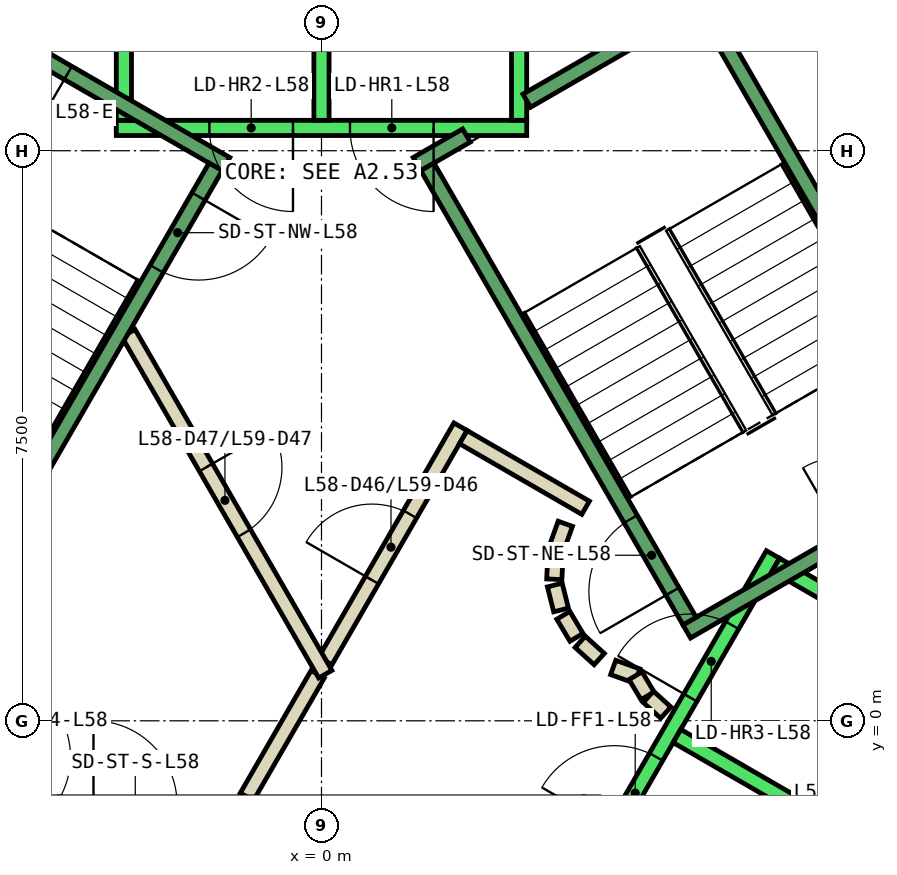
"""IFC4 building model, lengths in metres.
Left out: names, types, materials, properties, quantities, classifications, styles, units other than length and angle.
Written with IfcOpenShell. Run it as: python <this file> out.ifc"""

import sys

from ifc_helpers import new_model, si_unit, direction, frame, frame_2d, origin, place, context, subcontext, project, spatial, polyline, rectangle, outline, extrude, element, fill, save


model = new_model("IFC4")
c1 = context("Model", 3, precision=1e-05, world=origin(), true_north=direction((0.0, 1.0)))
c2 = subcontext(c1, "Body", "Model", "MODEL_VIEW")
j1 = project(units=[si_unit("LENGTHUNIT", "METRE"), si_unit("PLANEANGLEUNIT", "RADIAN")], contexts=[c1])
p1 = place(None, origin())
s1 = spatial("IfcSite", under=j1, at=p1, CompositionType="ELEMENT")
p2 = place(p1, origin())
s2 = spatial("IfcBuilding", under=s1, at=p2, CompositionType="ELEMENT")
p3 = place(p2, frame((0.0, 0.0, 255.8)))
s3 = spatial("IfcBuildingStorey", under=s2, at=p3, CompositionType="ELEMENT", Elevation=255.8)
p4 = place(p3, frame((0.0, 0.0, -0.34)))
e1 = element("IfcWall", 1, at=p4, inside=s3, PredefinedType="SHEAR", context=c2, shape_type="SweptSolid", body=[
    extrude(outline(polyline([(6.786, 10.747), (6.266, 10.447), (10.854, 2.5), (11.547, 2.5), (6.786, 10.747)])), origin(), (0.0, 0.0, 1.0), 3.6),
])
p5 = place(p3, frame((0.0, 0.0, -0.34)))
e2 = element("IfcWall", 2, at=p5, inside=s3, PredefinedType="SHEAR", context=c2, shape_type="SweptSolid", body=[
    extrude(outline(polyline([(5.774, -7.5), (11.547, 2.5), (10.854, 2.5), (5.427, -6.9), (5.774, -7.5)])), origin(), (0.0, 0.0, 1.0), 3.6),
])
p6 = place(p3, frame((-0.982, -1.0, 0.0), z_axis=(0.0, 0.0, 1.0), x_axis=(0.50024047865, 0.865886518847, 0.0)))
e3 = element("IfcWall", 3, at=p6, inside=s3, PredefinedType="PARTITIONING", context=c2, shape_type="SweptSolid", body=[
    extrude(rectangle(XDim=1.863, YDim=0.2, at=frame_2d((0.931, 0.0))), origin(), (0.0, 0.0, 1.0), 3.26),
])
p7 = place(p3, frame((0.05, 0.787, 0.0), z_axis=(0.0, 0.0, 1.0), x_axis=(0.499954076797, 0.866051915934, 0.0)))
e4 = element("IfcWall", 4, at=p7, inside=s3, PredefinedType="PARTITIONING", context=c2, shape_type="SweptSolid", body=[
    extrude(rectangle(XDim=3.558, YDim=0.2, at=frame_2d((1.779, 0.0))), origin(), (0.0, 0.0, 1.0), 3.26),
])
p8 = place(p7, frame((1.229, 0.0, 0.0)))
e5 = element("IfcOpeningElement", 5, at=p8, cuts=e4, PredefinedType="OPENING", context=c2, shape_type="SweptSolid", body=[
    extrude(rectangle(XDim=1.0, YDim=2.1, at=frame_2d((0.5, 1.05))), frame((0.0, 0.11, 0.0), z_axis=(0.0, -1.0, 0.0), x_axis=(1.0, 0.0, 0.0)), (0.0, 0.0, 1.0), 0.22),
])
p9 = place(p3, frame((1.866, 3.732, 0.0), z_axis=(0.0, 0.0, 1.0), x_axis=(0.866043361281, -0.499968895414, 0.0)))
e6 = element("IfcWall", 6, at=p9, inside=s3, PredefinedType="PARTITIONING", context=c2, shape_type="SweptSolid", body=[
    extrude(rectangle(XDim=1.858, YDim=0.2, at=frame_2d((0.929, 0.0))), origin(), (0.0, 0.0, 1.0), 3.26),
])
p10 = place(p3, frame((3.208, 2.592, 0.0), z_axis=(0.0, 0.0, 1.0), x_axis=(-0.337388820924, -0.941365382578, 0.0)))
e7 = element("IfcWall", 7, at=p10, inside=s3, PredefinedType="PARTITIONING", context=c2, shape_type="SweptSolid", body=[
    extrude(rectangle(XDim=0.338, YDim=0.2, at=frame_2d((0.169, 0.0))), origin(), (0.0, 0.0, 1.0), 3.26),
])
p11 = place(p3, frame((3.079, 2.199, 0.0), z_axis=(0.0, 0.0, 1.0), x_axis=(-0.047771483479, -0.998858290933, 0.0)))
e8 = element("IfcWall", 8, at=p11, inside=s3, PredefinedType="PARTITIONING", context=c2, shape_type="SweptSolid", body=[
    extrude(rectangle(XDim=0.337, YDim=0.2, at=frame_2d((0.169, 0.0))), origin(), (0.0, 0.0, 1.0), 3.26),
])
p12 = place(p3, frame((3.07, 1.786, 0.0), z_axis=(0.0, 0.0, 1.0), x_axis=(0.242705583207, -0.970099994784, 0.0)))
e9 = element("IfcWall", 9, at=p12, inside=s3, PredefinedType="PARTITIONING", context=c2, shape_type="SweptSolid", body=[
    extrude(rectangle(XDim=0.338, YDim=0.2, at=frame_2d((0.169, 0.0))), origin(), (0.0, 0.0, 1.0), 3.26),
])
for number, where, z_axis, x_axis in (
    (10, (3.182, 1.388, 0.0), (0.0, 0.0, 1.0), (0.512, -0.859, 0.0)),
    (11, (3.404, 1.039, 0.0), (0.0, 0.0, 1.0), (0.74, -0.672, 0.0)),
):
    element("IfcWall", number, at=place(p3, frame(where, z_axis=z_axis, x_axis=x_axis)), inside=s3, PredefinedType="PARTITIONING", context=c2, shape_type="SweptSolid", body=[
        extrude(rectangle(XDim=0.338, YDim=0.2, at=frame_2d((0.169, 0.0))), origin(), (0.0, 0.0, 1.0), 3.26),
    ])
p13 = place(p3, frame((3.838, 0.702, 0.0), z_axis=(0.0, 0.0, 1.0), x_axis=(0.941035081519, -0.338308993895, 0.0)))
e12 = element("IfcWall", 12, at=p13, inside=s3, PredefinedType="PARTITIONING", context=c2, shape_type="SweptSolid", body=[
    extrude(rectangle(XDim=0.337, YDim=0.2, at=frame_2d((0.168, 0.0))), origin(), (0.0, 0.0, 1.0), 3.26),
])
p14 = place(p3, frame((4.132, 0.593, 0.0), z_axis=(0.0, 0.0, 1.0), x_axis=(0.513561617048, -0.858052717201, 0.0)))
e13 = element("IfcWall", 13, at=p14, inside=s3, PredefinedType="PARTITIONING", context=c2, shape_type="SweptSolid", body=[
    extrude(rectangle(XDim=0.308, YDim=0.2, at=frame_2d((0.154, 0.0))), origin(), (0.0, 0.0, 1.0), 3.26),
])
p15 = place(p3, frame((4.301, 0.315, 0.0), z_axis=(0.0, 0.0, 1.0), x_axis=(0.741798017506, -0.670623367639, 0.0)))
e14 = element("IfcWall", 14, at=p15, inside=s3, PredefinedType="PARTITIONING", context=c2, shape_type="SweptSolid", body=[
    extrude(rectangle(XDim=0.309, YDim=0.2, at=frame_2d((0.154, 0.0))), origin(), (0.0, 0.0, 1.0), 3.26),
])
p16 = place(p3, frame((-2.54, 5.1, 0.0), z_axis=(0.0, 0.0, 1.0), x_axis=(0.499925051871, -0.866068670783, 0.0)))
e15 = element("IfcWall", 15, at=p16, inside=s3, PredefinedType="PARTITIONING", context=c2, shape_type="SweptSolid", body=[
    extrude(rectangle(XDim=5.181, YDim=0.2, at=frame_2d((2.59, 0.0))), origin(), (0.0, 0.0, 1.0), 3.26),
])
p17 = place(p16, frame((2.04, 0.0, 0.0)))
e16 = element("IfcOpeningElement", 16, at=p17, cuts=e15, PredefinedType="OPENING", context=c2, shape_type="SweptSolid", body=[
    extrude(rectangle(XDim=1.0, YDim=2.1, at=frame_2d((0.5, 1.05))), frame((0.0, 0.11, 0.0), z_axis=(0.0, -1.0, 0.0), x_axis=(1.0, 0.0, 0.0)), (0.0, 0.0, 1.0), 0.22),
])
p18 = place(p3, frame((2.7, 7.8, 0.0), z_axis=(0.0, 0.0, 1.0), x_axis=(-1.0, 0.0, 0.0)))
e17 = element("IfcWall", 17, at=p18, inside=s3, PredefinedType="STANDARD", context=c2, shape_type="SweptSolid", body=[
    extrude(rectangle(XDim=5.4, YDim=0.2, at=frame_2d((2.7, 0.0))), origin(), (0.0, 0.0, 1.0), 3.26),
])
p19 = place(p18, frame((1.225, 0.0, 0.0)))
e18 = element("IfcOpeningElement", 18, at=p19, cuts=e17, PredefinedType="OPENING", context=c2, shape_type="SweptSolid", body=[
    extrude(rectangle(XDim=1.1, YDim=2.1, at=frame_2d((0.55, 1.05))), frame((0.0, 0.11, 0.0), z_axis=(0.0, -1.0, 0.0), x_axis=(1.0, 0.0, 0.0)), (0.0, 0.0, 1.0), 0.22),
])
p20 = place(p18, frame((3.075, 0.0, 0.0)))
e19 = element("IfcOpeningElement", 19, at=p20, cuts=e17, PredefinedType="OPENING", context=c2, shape_type="SweptSolid", body=[
    extrude(rectangle(XDim=1.1, YDim=2.1, at=frame_2d((0.55, 1.05))), frame((0.0, 0.11, 0.0), z_axis=(0.0, -1.0, 0.0), x_axis=(1.0, 0.0, 0.0)), (0.0, 0.0, 1.0), 0.22),
])
for number, where, z_axis, x_axis in (
    (20, (2.6, 7.9, 0.0), (0.0, 0.0, 1.0), (0.0, 1.0, 0.0)),
    (21, (0.0, 7.9, 0.0), (0.0, 0.0, 1.0), (0.0, 1.0, 0.0)),
    (22, (-2.6, 7.9, 0.0), (0.0, 0.0, 1.0), (0.0, 1.0, 0.0)),
):
    element("IfcWall", number, at=place(p3, frame(where, z_axis=z_axis, x_axis=x_axis)), inside=s3, PredefinedType="STANDARD", context=c2, shape_type="SweptSolid", body=[
        extrude(rectangle(XDim=2.4, YDim=0.2, at=frame_2d((1.2, 0.0))), origin(), (0.0, 0.0, 1.0), 3.26),
    ])
p21 = place(p3, frame((-5.94, 2.188, 0.0), z_axis=(0.0, 0.0, 1.0), x_axis=(0.500034260056, -0.866005622828, 0.0)))
e23 = element("IfcWall", 23, at=p21, inside=s3, PredefinedType="STANDARD", context=c2, shape_type="SweptSolid", body=[
    extrude(rectangle(XDim=5.399, YDim=0.2, at=frame_2d((2.7, 0.0))), origin(), (0.0, 0.0, 1.0), 3.26),
])
p22 = place(p21, frame((3.075, 0.0, 0.0)))
e24 = element("IfcOpeningElement", 24, at=p22, cuts=e23, PredefinedType="OPENING", context=c2, shape_type="SweptSolid", body=[
    extrude(rectangle(XDim=1.1, YDim=2.1, at=frame_2d((0.55, 1.05))), frame((0.0, 0.11, 0.0), z_axis=(0.0, -1.0, 0.0), x_axis=(1.0, 0.0, 0.0)), (0.0, 0.0, 1.0), 0.22),
])
p23 = place(p21, frame((1.225, 0.0, 0.0)))
e25 = element("IfcOpeningElement", 25, at=p23, cuts=e23, PredefinedType="OPENING", context=c2, shape_type="SweptSolid", body=[
    extrude(rectangle(XDim=1.1, YDim=2.1, at=frame_2d((0.55, 1.05))), frame((0.0, 0.11, 0.0), z_axis=(0.0, -1.0, 0.0), x_axis=(1.0, 0.0, 0.0)), (0.0, 0.0, 1.0), 0.22),
])
p24 = place(p3, frame((3.24, -2.488, 0.0), z_axis=(0.0, 0.0, 1.0), x_axis=(0.500034260056, 0.866005622828, 0.0)))
e26 = element("IfcWall", 26, at=p24, inside=s3, PredefinedType="STANDARD", context=c2, shape_type="SweptSolid", body=[
    extrude(rectangle(XDim=5.399, YDim=0.2, at=frame_2d((2.7, 0.0))), origin(), (0.0, 0.0, 1.0), 3.26),
])
p25 = place(p24, frame((3.225, 0.0, 0.0)))
e27 = element("IfcOpeningElement", 27, at=p25, cuts=e26, PredefinedType="OPENING", context=c2, shape_type="SweptSolid", body=[
    extrude(rectangle(XDim=1.1, YDim=2.1, at=frame_2d((0.55, 1.05))), frame((0.0, 0.11, 0.0), z_axis=(0.0, -1.0, 0.0), x_axis=(1.0, 0.0, 0.0)), (0.0, 0.0, 1.0), 0.22),
])
p26 = place(p24, frame((1.225, 0.0, 0.0)))
e28 = element("IfcOpeningElement", 28, at=p26, cuts=e26, PredefinedType="OPENING", context=c2, shape_type="SweptSolid", body=[
    extrude(rectangle(XDim=1.1, YDim=2.1, at=frame_2d((0.55, 1.05))), frame((0.0, 0.11, 0.0), z_axis=(0.0, -1.0, 0.0), x_axis=(1.0, 0.0, 0.0)), (0.0, 0.0, 1.0), 0.22),
])
p27 = place(p3, frame((5.492, -3.788, 0.0), z_axis=(0.0, 0.0, 1.0), x_axis=(0.500034260056, 0.866005622828, 0.0)))
e29 = element("IfcWall", 29, at=p27, inside=s3, PredefinedType="STANDARD", context=c2, shape_type="SweptSolid", body=[
    extrude(rectangle(XDim=5.399, YDim=0.2, at=frame_2d((2.7, 0.0))), origin(), (0.0, 0.0, 1.0), 3.26),
])
for number, where, z_axis, x_axis in (
    (30, (4.677, -0.2, 0.0), (0.0, 0.0, 1.0), (0.866, -0.5, 0.0)),
    (31, (5.977, 2.052, 0.0), (0.0, 0.0, 1.0), (0.866, -0.5, 0.0)),
):
    element("IfcWall", number, at=place(p3, frame(where, z_axis=z_axis, x_axis=x_axis)), inside=s3, PredefinedType="STANDARD", context=c2, shape_type="SweptSolid", body=[
        extrude(rectangle(XDim=2.399, YDim=0.2, at=frame_2d((1.2, 0.0))), origin(), (0.0, 0.0, 1.0), 3.26),
    ])
p28 = place(p3, frame((4.806, 1.176, 0.0), z_axis=(0.0, 0.0, 1.0), x_axis=(0.866059941101, 0.499940174841, 0.0)))
e32 = element("IfcWall", 32, at=p28, inside=s3, PredefinedType="STANDARD", context=c2, shape_type="SweptSolid", body=[
    extrude(rectangle(XDim=4.4, YDim=0.2, at=frame_2d((2.2, 0.0))), origin(), (0.0, 0.0, 1.0), 3.26),
])
p29 = place(p28, frame((2.4, 0.0, 0.0)))
e33 = element("IfcOpeningElement", 33, at=p29, cuts=e32, PredefinedType="OPENING", context=c2, shape_type="SweptSolid", body=[
    extrude(rectangle(XDim=1.1, YDim=2.2, at=frame_2d((0.55, 1.1))), frame((0.0, 0.11, 0.0), z_axis=(0.0, -1.0, 0.0), x_axis=(1.0, 0.0, 0.0)), (0.0, 0.0, 1.0), 0.22),
])
p30 = place(p3, frame((2.7, 8.158, 0.0), z_axis=(0.0, 0.0, 1.0), x_axis=(0.86611865017, 0.499838457731, 0.0)))
e34 = element("IfcWall", 34, at=p30, inside=s3, PredefinedType="STANDARD", context=c2, shape_type="SweptSolid", body=[
    extrude(rectangle(XDim=2.733, YDim=0.2, at=frame_2d((1.366, 0.0))), origin(), (0.0, 0.0, 1.0), 3.26),
])
p31 = place(p3, frame((1.256, 7.324, 0.0), z_axis=(0.0, 0.0, 1.0), x_axis=(0.865915093549, 0.500191014278, 0.0)))
e35 = element("IfcWall", 35, at=p31, inside=s3, PredefinedType="STANDARD", context=c2, shape_type="SweptSolid", body=[
    extrude(rectangle(XDim=0.752, YDim=0.2, at=frame_2d((0.376, 0.0))), origin(), (0.0, 0.0, 1.0), 3.26),
])
p32 = place(p3, frame((4.843, 1.312, 0.0), z_axis=(0.0, 0.0, 1.0), x_axis=(-0.499963383562, 0.866046543262, 0.0)))
e36 = element("IfcWall", 36, at=p32, inside=s3, PredefinedType="STANDARD", context=c2, shape_type="SweptSolid", body=[
    extrude(rectangle(XDim=6.9, YDim=0.2, at=frame_2d((3.45, 0.0))), origin(), (0.0, 0.0, 1.0), 3.26),
])
p33 = place(p32, frame((0.45, 0.0, 0.0)))
e37 = element("IfcOpeningElement", 37, at=p33, cuts=e36, PredefinedType="OPENING", context=c2, shape_type="SweptSolid", body=[
    extrude(rectangle(XDim=1.1, YDim=2.2, at=frame_2d((0.55, 1.1))), frame((0.0, 0.11, 0.0), z_axis=(0.0, -1.0, 0.0), x_axis=(1.0, 0.0, 0.0)), (0.0, 0.0, 1.0), 0.22),
])
p34 = place(p3, frame((8.48, 3.412, 0.0), z_axis=(0.0, 0.0, 1.0), x_axis=(-0.499978703459, 0.866037698999, 0.0)))
e38 = element("IfcWall", 38, at=p34, inside=s3, PredefinedType="STANDARD", context=c2, shape_type="SweptSolid", body=[
    extrude(rectangle(XDim=6.9, YDim=0.2, at=frame_2d((3.45, 0.0))), origin(), (0.0, 0.0, 1.0), 3.26),
])
p35 = place(p3, frame((-1.256, 7.324, 0.0), z_axis=(0.0, 0.0, 1.0), x_axis=(-0.866046073146, 0.499964197906, 0.0)))
e39 = element("IfcWall", 39, at=p35, inside=s3, PredefinedType="STANDARD", context=c2, shape_type="SweptSolid", body=[
    extrude(rectangle(XDim=4.4, YDim=0.2, at=frame_2d((2.2, 0.0))), origin(), (0.0, 0.0, 1.0), 3.26),
])
p36 = place(p35, frame((2.4, 0.0, 0.0)))
e40 = element("IfcOpeningElement", 40, at=p36, cuts=e39, PredefinedType="OPENING", context=c2, shape_type="SweptSolid", body=[
    extrude(rectangle(XDim=1.1, YDim=2.2, at=frame_2d((0.55, 1.1))), frame((0.0, 0.11, 0.0), z_axis=(0.0, -1.0, 0.0), x_axis=(1.0, 0.0, 0.0)), (0.0, 0.0, 1.0), 0.22),
])
p37 = place(p3, frame((-1.393, 7.288, 0.0), z_axis=(0.0, 0.0, 1.0), x_axis=(-0.499963383562, -0.866046543262, 0.0)))
e41 = element("IfcWall", 41, at=p37, inside=s3, PredefinedType="STANDARD", context=c2, shape_type="SweptSolid", body=[
    extrude(rectangle(XDim=6.9, YDim=0.2, at=frame_2d((3.45, 0.0))), origin(), (0.0, 0.0, 1.0), 3.26),
])
p38 = place(p37, frame((0.45, 0.0, 0.0)))
e42 = element("IfcOpeningElement", 42, at=p38, cuts=e41, PredefinedType="OPENING", context=c2, shape_type="SweptSolid", body=[
    extrude(rectangle(XDim=1.1, YDim=2.2, at=frame_2d((0.55, 1.1))), frame((0.0, 0.11, 0.0), z_axis=(0.0, -1.0, 0.0), x_axis=(1.0, 0.0, 0.0)), (0.0, 0.0, 1.0), 0.22),
])
p39 = place(p8, origin())
e43 = element("IfcDoor", 43, at=p39, inside=s3, OperationType="SINGLE_SWING_RIGHT", PredefinedType="DOOR", context=c2, shape_type="SweptSolid", body=[
    extrude(rectangle(XDim=1.0, YDim=2.1, at=frame_2d((0.5, 1.05))), frame((0.0, 0.025, 0.0), z_axis=(0.0, -1.0, 0.0), x_axis=(1.0, 0.0, 0.0)), (0.0, 0.0, 1.0), 0.05),
])
fill(e5, e43)
p40 = place(p17, origin())
e44 = element("IfcDoor", 44, at=p40, inside=s3, OperationType="SINGLE_SWING_RIGHT", PredefinedType="DOOR", context=c2, shape_type="SweptSolid", body=[
    extrude(rectangle(XDim=1.0, YDim=2.1, at=frame_2d((0.5, 1.05))), frame((0.0, 0.025, 0.0), z_axis=(0.0, -1.0, 0.0), x_axis=(1.0, 0.0, 0.0)), (0.0, 0.0, 1.0), 0.05),
])
fill(e16, e44)
p41 = place(p19, origin())
e45 = element("IfcDoor", 45, at=p41, inside=s3, OperationType="SLIDING_TO_LEFT", PredefinedType="DOOR", context=c2, shape_type="SweptSolid", body=[
    extrude(rectangle(XDim=1.1, YDim=2.1, at=frame_2d((0.55, 1.05))), frame((0.0, 0.025, 0.0), z_axis=(0.0, -1.0, 0.0), x_axis=(1.0, 0.0, 0.0)), (0.0, 0.0, 1.0), 0.05),
])
fill(e18, e45)
p42 = place(p20, origin())
e46 = element("IfcDoor", 46, at=p42, inside=s3, OperationType="SLIDING_TO_LEFT", PredefinedType="DOOR", context=c2, shape_type="SweptSolid", body=[
    extrude(rectangle(XDim=1.1, YDim=2.1, at=frame_2d((0.55, 1.05))), frame((0.0, 0.025, 0.0), z_axis=(0.0, -1.0, 0.0), x_axis=(1.0, 0.0, 0.0)), (0.0, 0.0, 1.0), 0.05),
])
fill(e19, e46)
p43 = place(p25, origin())
e47 = element("IfcDoor", 47, at=p43, inside=s3, OperationType="SLIDING_TO_LEFT", PredefinedType="DOOR", context=c2, shape_type="SweptSolid", body=[
    extrude(rectangle(XDim=1.1, YDim=2.1, at=frame_2d((0.55, 1.05))), frame((0.0, 0.025, 0.0), z_axis=(0.0, -1.0, 0.0), x_axis=(1.0, 0.0, 0.0)), (0.0, 0.0, 1.0), 0.05),
])
fill(e27, e47)
p44 = place(p26, origin())
e48 = element("IfcDoor", 48, at=p44, inside=s3, OperationType="SLIDING_TO_LEFT", PredefinedType="DOOR", context=c2, shape_type="SweptSolid", body=[
    extrude(rectangle(XDim=1.1, YDim=2.1, at=frame_2d((0.55, 1.05))), frame((0.0, 0.025, 0.0), z_axis=(0.0, -1.0, 0.0), x_axis=(1.0, 0.0, 0.0)), (0.0, 0.0, 1.0), 0.05),
])
fill(e28, e48)
p45 = place(p33, origin())
e49 = element("IfcDoor", 49, at=p45, inside=s3, OperationType="SINGLE_SWING_LEFT", PredefinedType="DOOR", context=c2, shape_type="SweptSolid", body=[
    extrude(rectangle(XDim=1.1, YDim=2.2, at=frame_2d((0.55, 1.1))), frame((0.0, 0.025, 0.0), z_axis=(0.0, -1.0, 0.0), x_axis=(1.0, 0.0, 0.0)), (0.0, 0.0, 1.0), 0.05),
])
fill(e37, e49)
p46 = place(p38, origin())
e50 = element("IfcDoor", 50, at=p46, inside=s3, OperationType="SINGLE_SWING_LEFT", PredefinedType="DOOR", context=c2, shape_type="SweptSolid", body=[
    extrude(rectangle(XDim=1.1, YDim=2.2, at=frame_2d((0.55, 1.1))), frame((0.0, 0.025, 0.0), z_axis=(0.0, -1.0, 0.0), x_axis=(1.0, 0.0, 0.0)), (0.0, 0.0, 1.0), 0.05),
])
fill(e42, e50)
p47 = place(p36, origin())
e51 = element("IfcDoor", 51, at=p47, inside=s3, OperationType="SINGLE_SWING_LEFT", PredefinedType="DOOR", context=c2, shape_type="SweptSolid", body=[
    extrude(rectangle(XDim=1.1, YDim=2.2, at=frame_2d((0.55, 1.1))), frame((0.0, 0.025, 0.0), z_axis=(0.0, -1.0, 0.0), x_axis=(1.0, 0.0, 0.0)), (0.0, 0.0, 1.0), 0.05),
])
fill(e40, e51)
save(model, sys.argv[1])
